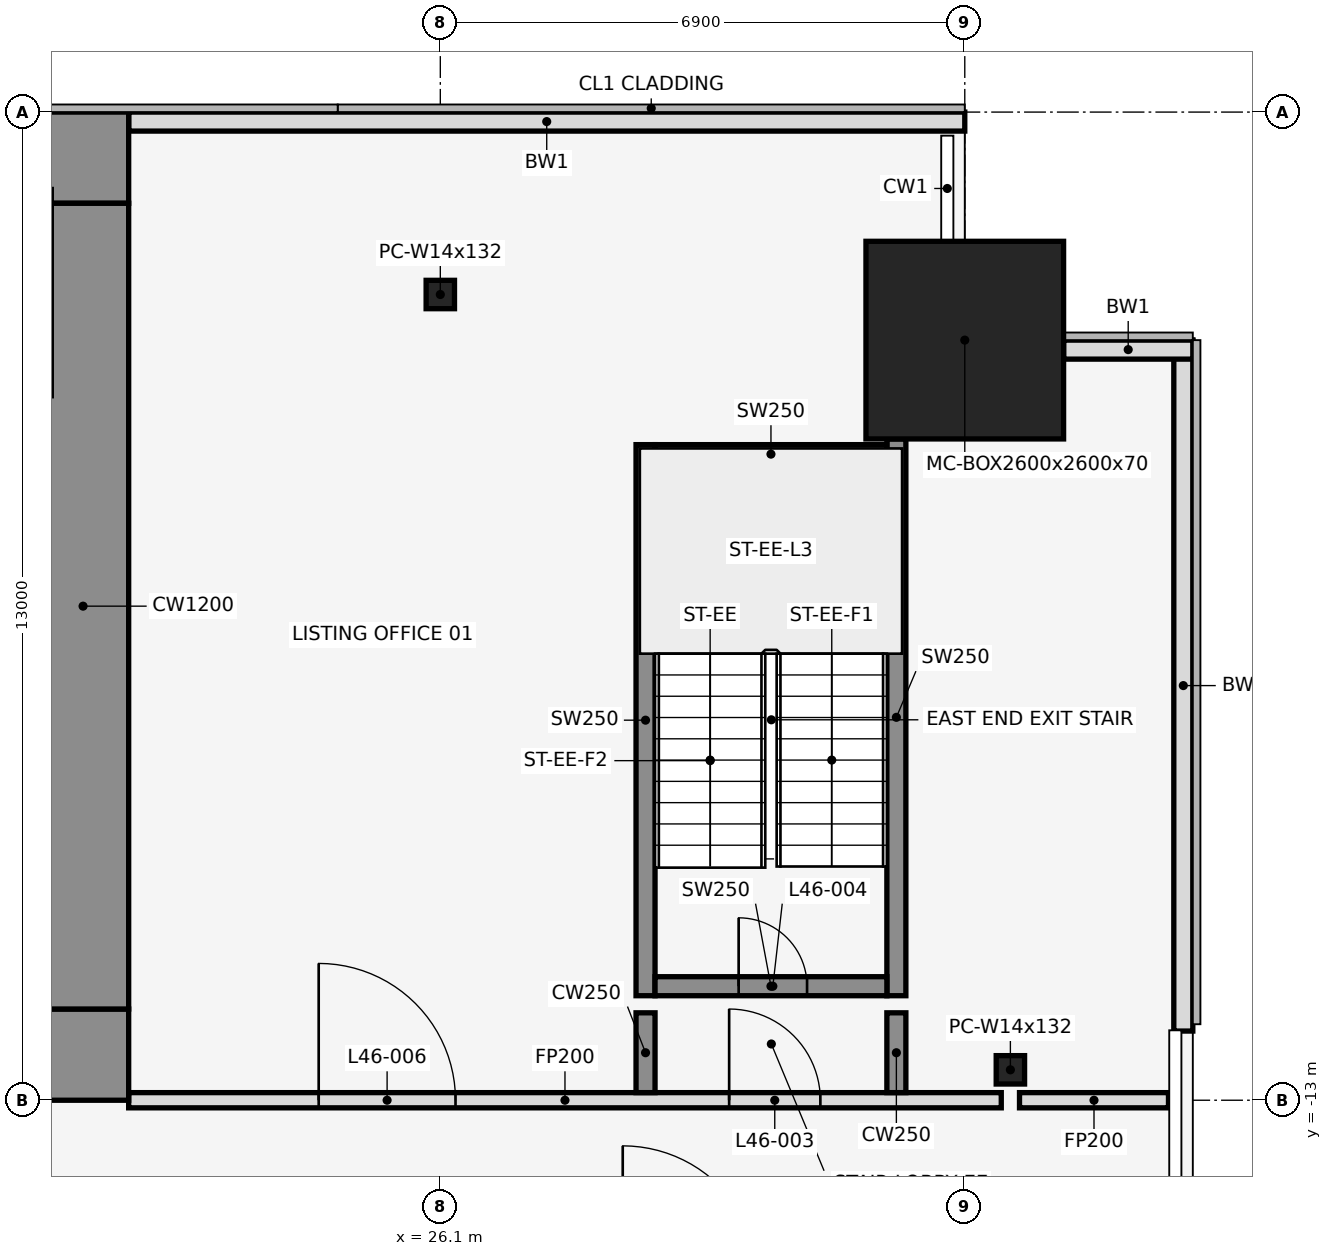
"""IFC4 building model, lengths in metres.
Left out: names, types, materials, properties, quantities, classifications, styles, units other than length and angle.
Written with IfcOpenShell. Run it as: python <this file> out.ifc"""

import sys

from ifc_helpers import new_model, si_unit, direction, frame, frame_2d, origin, origin_2d, place, context, subcontext, project, spatial, rectangle, hollow_rectangle, i_section, extrude, element, fill, save


model = new_model("IFC4")
c1 = context("Model", 3, precision=1e-05, world=origin(), true_north=direction((0.0, 1.0)))
c2 = subcontext(c1, "Body", "Model", "MODEL_VIEW")
j1 = project(units=[si_unit("LENGTHUNIT", "METRE"), si_unit("PLANEANGLEUNIT", "RADIAN")], contexts=[c1])
p1 = place(None, origin())
s1 = spatial("IfcSite", under=j1, at=p1, CompositionType="ELEMENT")
p2 = place(p1, origin())
s2 = spatial("IfcBuilding", under=s1, at=p2, CompositionType="ELEMENT")
p3 = place(p2, frame((0.0, 0.0, 207.3)))
s3 = spatial("IfcBuildingStorey", under=s2, at=p3, CompositionType="ELEMENT", Elevation=207.3)
p4 = place(p3, frame((26.1, -2.4, 0.0), z_axis=(0.0, 0.0, 1.0), x_axis=(1.0, 0.0, 0.0)))
e1 = element("IfcColumn", 1, at=p4, inside=s3, PredefinedType="COLUMN", context=c2, shape_type="SweptSolid", body=[
    extrude(i_section(OverallWidth=0.373, OverallDepth=0.373, WebThickness=0.016, FlangeThickness=0.026, at=origin_2d()), origin(), (0.0, 0.0, 1.0), 4.1),
])
p5 = place(p3, frame((33.0, -3.0, 0.0), z_axis=(0.0, 0.0, 1.0), x_axis=(1.0, 0.0, 0.0)))
e2 = element("IfcColumn", 2, at=p5, inside=s3, PredefinedType="COLUMN", context=c2, shape_type="SweptSolid", body=[
    extrude(hollow_rectangle(XDim=2.6, YDim=2.6, WallThickness=0.07, at=origin_2d()), origin(), (0.0, 0.0, 1.0), 4.1),
])
p6 = place(p3, frame((33.6, -12.6, 0.0), z_axis=(0.0, 0.0, 1.0), x_axis=(1.0, 0.0, 0.0)))
e3 = element("IfcColumn", 3, at=p6, inside=s3, PredefinedType="COLUMN", context=c2, shape_type="SweptSolid", body=[
    extrude(i_section(OverallWidth=0.373, OverallDepth=0.373, WebThickness=0.016, FlangeThickness=0.026, at=origin_2d()), origin(), (0.0, 0.0, 1.0), 4.1),
])
p7 = place(p3, frame((33.0, -0.125, 0.0), z_axis=(0.0, 0.0, 1.0), x_axis=(-1.0, 0.0, 0.0)))
e4 = element("IfcWall", 4, at=p7, inside=s3, PredefinedType="STANDARD", context=c2, shape_type="SweptSolid", body=[
    extrude(rectangle(XDim=11.0, YDim=0.25, at=frame_2d((5.5, 0.0))), origin(), (0.0, 0.0, 1.0), 3.95),
])
p8 = place(p3, frame((35.875, -12.09, 0.0), z_axis=(0.0, 0.0, 1.0), x_axis=(0.0, 1.0, 0.0)))
e5 = element("IfcWall", 5, at=p8, inside=s3, PredefinedType="STANDARD", context=c2, shape_type="SweptSolid", body=[
    extrude(rectangle(XDim=9.09, YDim=0.25, at=frame_2d((4.545, 0.0))), origin(), (0.0, 0.0, 1.0), 3.95),
])
p9 = place(p3, frame((36.0, -3.125, 0.0), z_axis=(0.0, 0.0, 1.0), x_axis=(-1.0, 0.0, 0.0)))
e6 = element("IfcWall", 6, at=p9, inside=s3, PredefinedType="STANDARD", context=c2, shape_type="SweptSolid", body=[
    extrude(rectangle(XDim=1.7, YDim=0.25, at=frame_2d((0.85, 0.0))), origin(), (0.0, 0.0, 1.0), 3.95),
])
p10 = place(p3, frame((28.8, -11.625, 0.0), z_axis=(0.0, 0.0, 1.0), x_axis=(0.0, 1.0, 0.0)))
e7 = element("IfcWall", 7, at=p10, inside=s3, PredefinedType="SHEAR", context=c2, shape_type="SweptSolid", body=[
    extrude(rectangle(XDim=7.25, YDim=0.25, at=frame_2d((3.625, 0.0))), origin(), (0.0, 0.0, 1.0), 4.1),
])
p11 = place(p3, frame((32.1, -11.625, 0.0), z_axis=(0.0, 0.0, 1.0), x_axis=(0.0, 1.0, 0.0)))
e8 = element("IfcWall", 8, at=p11, inside=s3, PredefinedType="SHEAR", context=c2, shape_type="SweptSolid", body=[
    extrude(rectangle(XDim=7.325, YDim=0.25, at=frame_2d((3.663, 0.0))), origin(), (0.0, 0.0, 1.0), 4.1),
])
p12 = place(p3, frame((28.925, -11.5, 0.0), z_axis=(0.0, 0.0, 1.0), x_axis=(1.0, 0.0, 0.0)))
e9 = element("IfcWall", 9, at=p12, inside=s3, PredefinedType="SHEAR", context=c2, shape_type="SweptSolid", body=[
    extrude(rectangle(XDim=3.05, YDim=0.25, at=frame_2d((1.525, 0.0))), origin(), (0.0, 0.0, 1.0), 4.1),
])
p13 = place(p12, frame((1.1, 0.0, 0.0)))
e10 = element("IfcOpeningElement", 10, at=p13, cuts=e9, PredefinedType="OPENING", context=c2, shape_type="SweptSolid", body=[
    extrude(rectangle(XDim=0.9, YDim=2.1, at=frame_2d((0.45, 1.05))), frame((0.0, 0.137, 0.0), z_axis=(0.0, -1.0, 0.0), x_axis=(1.0, 0.0, 0.0)), (0.0, 0.0, 1.0), 0.274),
])
p14 = place(p3, frame((28.925, -4.5, 0.0), z_axis=(0.0, 0.0, 1.0), x_axis=(1.0, 0.0, 0.0)))
e11 = element("IfcWall", 11, at=p14, inside=s3, PredefinedType="SHEAR", context=c2, shape_type="SweptSolid", body=[
    extrude(rectangle(XDim=3.05, YDim=0.25, at=frame_2d((1.525, 0.0))), origin(), (0.0, 0.0, 1.0), 4.1),
])
p15 = place(p3, frame((22.0, -13.0, 0.0), z_axis=(0.0, 0.0, 1.0), x_axis=(1.0, 0.0, 0.0)))
e12 = element("IfcWall", 12, at=p15, inside=s3, PredefinedType="PARTITIONING", context=c2, shape_type="SweptSolid", body=[
    extrude(rectangle(XDim=11.48, YDim=0.2, at=frame_2d((5.74, 0.0))), origin(), (0.0, 0.0, 1.0), 2.84),
])
p16 = place(p15, frame((7.9, 0.0, 0.0)))
e13 = element("IfcOpeningElement", 13, at=p16, cuts=e12, PredefinedType="OPENING", context=c2, shape_type="SweptSolid", body=[
    extrude(rectangle(XDim=1.2, YDim=2.1, at=frame_2d((0.6, 1.05))), frame((0.0, 0.112, 0.0), z_axis=(0.0, -1.0, 0.0), x_axis=(1.0, 0.0, 0.0)), (0.0, 0.0, 1.0), 0.224),
])
p17 = place(p15, frame((2.5, 0.0, 0.0)))
e14 = element("IfcOpeningElement", 14, at=p17, cuts=e12, PredefinedType="OPENING", context=c2, shape_type="SweptSolid", body=[
    extrude(rectangle(XDim=1.8, YDim=2.1, at=frame_2d((0.9, 1.05))), frame((0.0, 0.112, 0.0), z_axis=(0.0, -1.0, 0.0), x_axis=(1.0, 0.0, 0.0)), (0.0, 0.0, 1.0), 0.224),
])
p18 = place(p3, frame((33.72, -13.0, 0.0), z_axis=(0.0, 0.0, 1.0), x_axis=(1.0, 0.0, 0.0)))
e15 = element("IfcWall", 15, at=p18, inside=s3, PredefinedType="PARTITIONING", context=c2, shape_type="SweptSolid", body=[
    extrude(rectangle(XDim=1.96, YDim=0.2, at=frame_2d((0.98, 0.0))), origin(), (0.0, 0.0, 1.0), 2.84),
])
for number, where, z_axis, x_axis in (
    (16, (28.8, -12.9, 0.0), (0.0, 0.0, 1.0), (0.0, 1.0, 0.0)),
    (17, (32.1, -12.9, 0.0), (0.0, 0.0, 1.0), (0.0, 1.0, 0.0)),
):
    element("IfcWall", number, at=place(p3, frame(where, z_axis=z_axis, x_axis=x_axis)), inside=s3, PredefinedType="SHEAR", context=c2, shape_type="SweptSolid", body=[
        extrude(rectangle(XDim=1.05, YDim=0.25, at=frame_2d((0.525, 0.0))), origin(), (0.0, 0.0, 1.0), 4.1),
    ])
p19 = place(p3, frame((-22.0, -0.6, 0.0), z_axis=(0.0, 0.0, 1.0), x_axis=(1.0, 0.0, 0.0)))
e18 = element("IfcWall", 18, at=p19, inside=s3, PredefinedType="SHEAR", context=c2, shape_type="SweptSolid", body=[
    extrude(rectangle(XDim=44.0, YDim=1.2, at=frame_2d((22.0, 0.0))), origin(), (0.0, 0.0, 1.0), 4.1),
])
p20 = place(p19, frame((18.55, 0.0, 0.0)))
e19 = element("IfcOpeningElement", 19, at=p20, cuts=e18, PredefinedType="OPENING", context=c2, shape_type="SweptSolid", body=[
    extrude(rectangle(XDim=0.9, YDim=2.1, at=frame_2d((0.45, 1.05))), frame((0.0, 0.612, 0.0), z_axis=(0.0, -1.0, 0.0), x_axis=(1.0, 0.0, 0.0)), (0.0, 0.0, 1.0), 1.224),
])
p21 = place(p19, frame((24.55, 0.0, 0.0)))
e20 = element("IfcOpeningElement", 20, at=p21, cuts=e18, PredefinedType="OPENING", context=c2, shape_type="SweptSolid", body=[
    extrude(rectangle(XDim=0.9, YDim=2.1, at=frame_2d((0.45, 1.05))), frame((0.0, 0.612, 0.0), z_axis=(0.0, -1.0, 0.0), x_axis=(1.0, 0.0, 0.0)), (0.0, 0.0, 1.0), 1.224),
])
p22 = place(p3, frame((-22.0, -12.4, 0.0), z_axis=(0.0, 0.0, 1.0), x_axis=(1.0, 0.0, 0.0)))
e21 = element("IfcWall", 21, at=p22, inside=s3, PredefinedType="SHEAR", context=c2, shape_type="SweptSolid", body=[
    extrude(rectangle(XDim=44.0, YDim=1.2, at=frame_2d((22.0, 0.0))), origin(), (0.0, 0.0, 1.0), 4.1),
])
p23 = place(p22, frame((2.2, 0.0, 0.0)))
e22 = element("IfcOpeningElement", 22, at=p23, cuts=e21, PredefinedType="OPENING", context=c2, shape_type="SweptSolid", body=[
    extrude(rectangle(XDim=1.2, YDim=2.1, at=frame_2d((0.6, 1.05))), frame((0.0, 0.612, 0.0), z_axis=(0.0, -1.0, 0.0), x_axis=(1.0, 0.0, 0.0)), (0.0, 0.0, 1.0), 1.224),
])
p24 = place(p22, frame((21.4, 0.0, 0.0)))
e23 = element("IfcOpeningElement", 23, at=p24, cuts=e21, PredefinedType="OPENING", context=c2, shape_type="SweptSolid", body=[
    extrude(rectangle(XDim=1.2, YDim=2.1, at=frame_2d((0.6, 1.05))), frame((0.0, 0.612, 0.0), z_axis=(0.0, -1.0, 0.0), x_axis=(1.0, 0.0, 0.0)), (0.0, 0.0, 1.0), 1.224),
])
p25 = place(p22, frame((40.6, 0.0, 0.0)))
e24 = element("IfcOpeningElement", 24, at=p25, cuts=e21, PredefinedType="OPENING", context=c2, shape_type="SweptSolid", body=[
    extrude(rectangle(XDim=1.2, YDim=2.1, at=frame_2d((0.6, 1.05))), frame((0.0, 0.612, 0.0), z_axis=(0.0, -1.0, 0.0), x_axis=(1.0, 0.0, 0.0)), (0.0, 0.0, 1.0), 1.224),
])
p26 = place(p22, frame((16.0, 0.0, 0.0)))
e25 = element("IfcOpeningElement", 25, at=p26, cuts=e21, PredefinedType="OPENING", context=c2, shape_type="SweptSolid", body=[
    extrude(rectangle(XDim=1.8, YDim=2.1, at=frame_2d((0.9, 1.05))), frame((0.0, 0.612, 0.0), z_axis=(0.0, -1.0, 0.0), x_axis=(1.0, 0.0, 0.0)), (0.0, 0.0, 1.0), 1.224),
])
p27 = place(p22, frame((6.3, 0.0, 0.0)))
e26 = element("IfcOpeningElement", 26, at=p27, cuts=e21, PredefinedType="OPENING", context=c2, shape_type="SweptSolid", body=[
    extrude(rectangle(XDim=1.2, YDim=2.1, at=frame_2d((0.6, 1.05))), frame((0.0, 0.612, 0.0), z_axis=(0.0, -1.0, 0.0), x_axis=(1.0, 0.0, 0.0)), (0.0, 0.0, 1.0), 1.224),
])
p28 = place(p22, frame((26.2, 0.0, 0.0)))
e27 = element("IfcOpeningElement", 27, at=p28, cuts=e21, PredefinedType="OPENING", context=c2, shape_type="SweptSolid", body=[
    extrude(rectangle(XDim=1.8, YDim=2.1, at=frame_2d((0.9, 1.05))), frame((0.0, 0.612, 0.0), z_axis=(0.0, -1.0, 0.0), x_axis=(1.0, 0.0, 0.0)), (0.0, 0.0, 1.0), 1.224),
])
p29 = place(p22, frame((36.5, 0.0, 0.0)))
e28 = element("IfcOpeningElement", 28, at=p29, cuts=e21, PredefinedType="OPENING", context=c2, shape_type="SweptSolid", body=[
    extrude(rectangle(XDim=1.2, YDim=2.1, at=frame_2d((0.6, 1.05))), frame((0.0, 0.612, 0.0), z_axis=(0.0, -1.0, 0.0), x_axis=(1.0, 0.0, 0.0)), (0.0, 0.0, 1.0), 1.224),
])
p30 = place(p3, frame((21.4, -11.8, 0.0), z_axis=(0.0, 0.0, 1.0), x_axis=(0.0, 1.0, 0.0)))
e29 = element("IfcWall", 29, at=p30, inside=s3, PredefinedType="SHEAR", context=c2, shape_type="SweptSolid", body=[
    extrude(rectangle(XDim=10.6, YDim=1.2, at=frame_2d((5.3, 0.0))), origin(), (0.0, 0.0, 1.0), 4.1),
])
p31 = place(p16, origin())
e30 = element("IfcDoor", 30, at=p31, inside=s3, OperationType="SINGLE_SWING_RIGHT", PredefinedType="DOOR", context=c2, shape_type="SweptSolid", body=[
    extrude(rectangle(XDim=1.2, YDim=2.1, at=frame_2d((0.6, 1.05))), frame((0.0, 0.025, 0.0), z_axis=(0.0, -1.0, 0.0), x_axis=(1.0, 0.0, 0.0)), (0.0, 0.0, 1.0), 0.05),
])
fill(e13, e30)
p32 = place(p13, origin())
e31 = element("IfcDoor", 31, at=p32, inside=s3, OperationType="SINGLE_SWING_LEFT", PredefinedType="DOOR", context=c2, shape_type="SweptSolid", body=[
    extrude(rectangle(XDim=0.9, YDim=2.1, at=frame_2d((0.45, 1.05))), frame((0.0, 0.025, 0.0), z_axis=(0.0, -1.0, 0.0), x_axis=(1.0, 0.0, 0.0)), (0.0, 0.0, 1.0), 0.05),
])
fill(e10, e31)
p33 = place(p17, origin())
e32 = element("IfcDoor", 32, at=p33, inside=s3, OperationType="SINGLE_SWING_LEFT", PredefinedType="DOOR", context=c2, shape_type="SweptSolid", body=[
    extrude(rectangle(XDim=1.8, YDim=2.1, at=frame_2d((0.9, 1.05))), frame((0.0, 0.025, 0.0), z_axis=(0.0, -1.0, 0.0), x_axis=(1.0, 0.0, 0.0)), (0.0, 0.0, 1.0), 0.05),
])
fill(e14, e32)
save(model, sys.argv[1])
